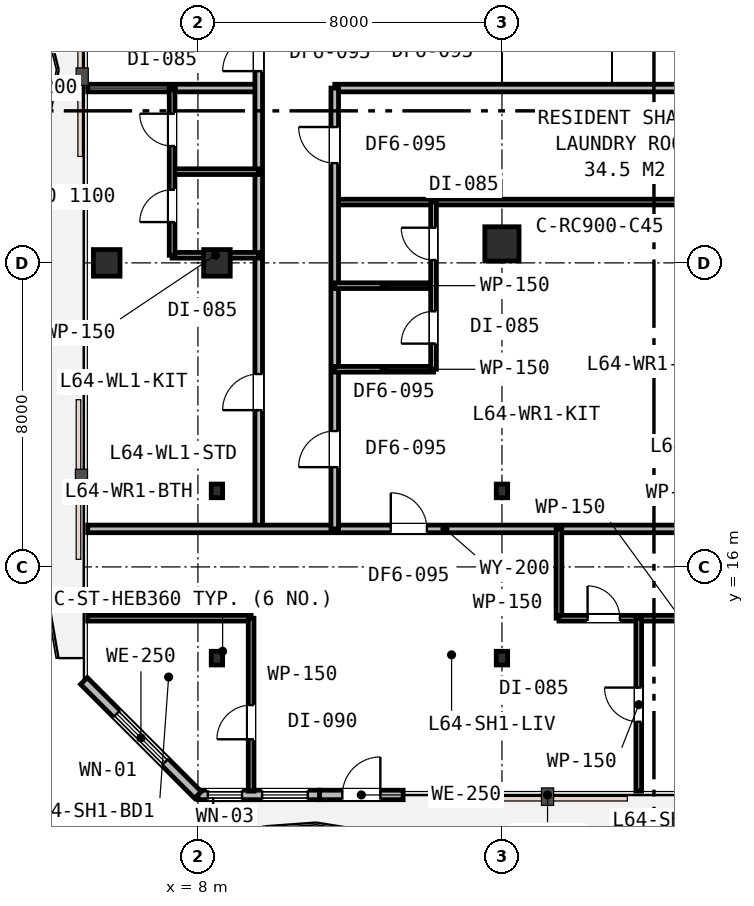
"""IFC4 building model, lengths in metres.
Left out: names, types, materials, properties, quantities, classifications, styles, units other than length and angle.
Written with IfcOpenShell. Run it as: python <this file> out.ifc"""

import sys

from ifc_helpers import new_model, si_unit, direction, frame, frame_2d, origin, origin_2d, place, context, subcontext, project, spatial, rectangle, i_section, extrude, element, fill, save


model = new_model("IFC4")
c1 = context("Model", 3, precision=1e-05, world=origin(), true_north=direction((0.0, 1.0)))
c2 = subcontext(c1, "Body", "Model", "MODEL_VIEW")
j1 = project(units=[si_unit("LENGTHUNIT", "METRE"), si_unit("PLANEANGLEUNIT", "RADIAN")], contexts=[c1])
p1 = place(None, origin())
s1 = spatial("IfcSite", under=j1, at=p1, CompositionType="ELEMENT")
p2 = place(p1, origin())
s2 = spatial("IfcBuilding", under=s1, at=p2, CompositionType="ELEMENT")
p3 = place(p2, frame((0.0, 0.0, 248.8)))
s3 = spatial("IfcBuildingStorey", under=s2, at=p3, CompositionType="ELEMENT", Elevation=248.8)
p4 = place(p3, frame((8.5, 24.0, 0.0), z_axis=(0.0, 0.0, 1.0), x_axis=(1.0, 0.0, 0.0)))
e1 = element("IfcColumn", 1, at=p4, inside=s3, PredefinedType="COLUMN", context=c2, shape_type="SweptSolid", body=[
    extrude(rectangle(XDim=0.7, YDim=0.7, at=origin_2d()), origin(), (0.0, 0.0, 1.0), 3.8),
])
p5 = place(p3, frame((16.0, 24.5, 0.0), z_axis=(0.0, 0.0, 1.0), x_axis=(1.0, 0.0, 0.0)))
e2 = element("IfcColumn", 2, at=p5, inside=s3, PredefinedType="COLUMN", context=c2, shape_type="SweptSolid", body=[
    extrude(rectangle(XDim=0.9, YDim=0.9, at=origin_2d()), origin(), (0.0, 0.0, 1.0), 3.8),
])
p6 = place(p3, frame((5.6, 24.0, 0.0), z_axis=(0.0, 0.0, 1.0), x_axis=(1.0, 0.0, 0.0)))
e3 = element("IfcColumn", 3, at=p6, inside=s3, PredefinedType="COLUMN", context=c2, shape_type="SweptSolid", body=[
    extrude(rectangle(XDim=0.7, YDim=0.7, at=origin_2d()), origin(), (0.0, 0.0, 1.0), 3.8),
])
for number, where, z_axis, x_axis in (
    (4, (8.5, 13.6, 0.0), (0.0, 0.0, 1.0), (1.0, 0.0, 0.0)),
    (5, (16.0, 13.6, 0.0), (0.0, 0.0, 1.0), (1.0, 0.0, 0.0)),
    (6, (8.5, 18.0, 0.0), (0.0, 0.0, 1.0), (1.0, 0.0, 0.0)),
    (7, (16.0, 18.0, 0.0), (0.0, 0.0, 1.0), (1.0, 0.0, 0.0)),
):
    element("IfcColumn", number, at=place(p3, frame(where, z_axis=z_axis, x_axis=x_axis)), inside=s3, PredefinedType="COLUMN", context=c2, shape_type="SweptSolid", body=[
        extrude(i_section(OverallWidth=0.3, OverallDepth=0.36, WebThickness=0.013, FlangeThickness=0.022, FilletRadius=0.027, at=origin_2d()), origin(), (0.0, 0.0, 1.0), 3.8),
    ])
p7 = place(p3, frame((11.2, 10.0, 0.0), z_axis=(0.0, 0.0, 1.0), x_axis=(1.0, 0.0, 0.0)))
e8 = element("IfcWall", 8, at=p7, inside=s3, PredefinedType="STANDARD", context=c2, shape_type="SweptSolid", body=[
    extrude(rectangle(XDim=2.2, YDim=0.25, at=frame_2d((1.1, 0.0))), origin(), (0.0, 0.0, 1.0), 3.53),
])
p8 = place(p7, frame((0.6, 0.0, 0.0)))
e9 = element("IfcOpeningElement", 9, at=p8, cuts=e8, PredefinedType="OPENING", context=c2, shape_type="SweptSolid", body=[
    extrude(rectangle(XDim=1.0, YDim=2.15, at=frame_2d((0.5, 1.075))), frame((0.0, 0.135, 0.0), z_axis=(0.0, -1.0, 0.0), x_axis=(1.0, 0.0, 0.0)), (0.0, 0.0, 1.0), 0.27),
])
p9 = place(p3, frame((8.0, 10.0, 0.0), z_axis=(0.0, 0.0, 1.0), x_axis=(1.0, 0.0, 0.0)))
e10 = element("IfcWall", 10, at=p9, inside=s3, PredefinedType="STANDARD", context=c2, shape_type="SweptSolid", body=[
    extrude(rectangle(XDim=3.2, YDim=0.25, at=frame_2d((1.6, 0.0))), origin(), (0.0, 0.0, 1.0), 3.53),
])
p10 = place(p9, frame((0.26, 0.0, 0.9)))
e11 = element("IfcOpeningElement", 11, at=p10, cuts=e10, PredefinedType="OPENING", context=c2, shape_type="SweptSolid", body=[
    extrude(rectangle(XDim=0.9, YDim=1.55, at=frame_2d((0.45, 0.775))), frame((0.0, 0.135, 0.0), z_axis=(0.0, -1.0, 0.0), x_axis=(1.0, 0.0, 0.0)), (0.0, 0.0, 1.0), 0.27),
])
p11 = place(p9, frame((1.69, 0.0, 0.85)))
e12 = element("IfcOpeningElement", 12, at=p11, cuts=e10, PredefinedType="OPENING", context=c2, shape_type="SweptSolid", body=[
    extrude(rectangle(XDim=1.2, YDim=1.6, at=frame_2d((0.6, 0.8))), frame((0.0, 0.135, 0.0), z_axis=(0.0, -1.0, 0.0), x_axis=(1.0, 0.0, 0.0)), (0.0, 0.0, 1.0), 0.27),
])
p12 = place(p3, frame((5.0, 13.0, 0.0), z_axis=(0.0, 0.0, 1.0), x_axis=(0.707106781187, -0.707106781187, 0.0)))
e13 = element("IfcWall", 13, at=p12, inside=s3, PredefinedType="STANDARD", context=c2, shape_type="SweptSolid", body=[
    extrude(rectangle(XDim=4.243, YDim=0.25, at=frame_2d((2.121, 0.0))), origin(), (0.0, 0.0, 1.0), 3.53),
])
p13 = place(p12, frame((1.221, 0.0, 0.75)))
e14 = element("IfcOpeningElement", 14, at=p13, cuts=e13, PredefinedType="OPENING", context=c2, shape_type="SweptSolid", body=[
    extrude(rectangle(XDim=1.8, YDim=1.85, at=frame_2d((0.9, 0.925))), frame((0.0, 0.135, 0.0), z_axis=(0.0, -1.0, 0.0), x_axis=(1.0, 0.0, 0.0)), (0.0, 0.0, 1.0), 0.27),
])
p14 = place(p3, frame((5.1, 28.6, 0.0), z_axis=(0.0, 0.0, 1.0), x_axis=(1.0, 0.0, 0.0)))
e15 = element("IfcWall", 15, at=p14, inside=s3, PredefinedType="PARTITIONING", context=c2, shape_type="SweptSolid", body=[
    extrude(rectangle(XDim=4.5, YDim=0.2, at=frame_2d((2.25, 0.0))), origin(), (0.0, 0.0, 1.0), 3.16),
])
p15 = place(p3, frame((11.6, 28.6, 0.0), z_axis=(0.0, 0.0, 1.0), x_axis=(1.0, 0.0, 0.0)))
e16 = element("IfcWall", 16, at=p15, inside=s3, PredefinedType="PARTITIONING", context=c2, shape_type="SweptSolid", body=[
    extrude(rectangle(XDim=34.3, YDim=0.2, at=frame_2d((17.15, 0.0))), origin(), (0.0, 0.0, 1.0), 3.16),
])
p16 = place(p15, frame((14.625, 0.0, 0.0)))
e17 = element("IfcOpeningElement", 17, at=p16, cuts=e16, PredefinedType="OPENING", context=c2, shape_type="SweptSolid", body=[
    extrude(rectangle(XDim=0.95, YDim=2.15, at=frame_2d((0.475, 1.075))), frame((0.0, 0.11, 0.0), z_axis=(0.0, -1.0, 0.0), x_axis=(1.0, 0.0, 0.0)), (0.0, 0.0, 1.0), 0.22),
])
p17 = place(p15, frame((26.225, 0.0, 0.0)))
e18 = element("IfcOpeningElement", 18, at=p17, cuts=e16, PredefinedType="OPENING", context=c2, shape_type="SweptSolid", body=[
    extrude(rectangle(XDim=0.95, YDim=2.15, at=frame_2d((0.475, 1.075))), frame((0.0, 0.11, 0.0), z_axis=(0.0, -1.0, 0.0), x_axis=(1.0, 0.0, 0.0)), (0.0, 0.0, 1.0), 0.22),
])
p18 = place(p3, frame((9.6, 17.0, 0.0), z_axis=(0.0, 0.0, 1.0), x_axis=(0.0, 1.0, 0.0)))
e19 = element("IfcWall", 19, at=p18, inside=s3, PredefinedType="PARTITIONING", context=c2, shape_type="SweptSolid", body=[
    extrude(rectangle(XDim=25.9, YDim=0.2, at=frame_2d((12.95, 0.0))), origin(), (0.0, 0.0, 1.0), 3.16),
])
p19 = place(p18, frame((12.045, 0.0, 0.0)))
e20 = element("IfcOpeningElement", 20, at=p19, cuts=e19, PredefinedType="OPENING", context=c2, shape_type="SweptSolid", body=[
    extrude(rectangle(XDim=0.95, YDim=2.15, at=frame_2d((0.475, 1.075))), frame((0.0, 0.11, 0.0), z_axis=(0.0, -1.0, 0.0), x_axis=(1.0, 0.0, 0.0)), (0.0, 0.0, 1.0), 0.22),
])
p20 = place(p18, frame((3.125, 0.0, 0.0)))
e21 = element("IfcOpeningElement", 21, at=p20, cuts=e19, PredefinedType="OPENING", context=c2, shape_type="SweptSolid", body=[
    extrude(rectangle(XDim=0.95, YDim=2.15, at=frame_2d((0.475, 1.075))), frame((0.0, 0.11, 0.0), z_axis=(0.0, -1.0, 0.0), x_axis=(1.0, 0.0, 0.0)), (0.0, 0.0, 1.0), 0.22),
])
p21 = place(p3, frame((5.1, 17.0, 0.0), z_axis=(0.0, 0.0, 1.0), x_axis=(1.0, 0.0, 0.0)))
e22 = element("IfcWall", 22, at=p21, inside=s3, PredefinedType="PARTITIONING", context=c2, shape_type="SweptSolid", body=[
    extrude(rectangle(XDim=18.8, YDim=0.2, at=frame_2d((9.4, 0.0))), origin(), (0.0, 0.0, 1.0), 3.16),
])
p22 = place(p21, frame((7.975, 0.0, 0.0)))
e23 = element("IfcOpeningElement", 23, at=p22, cuts=e22, PredefinedType="OPENING", context=c2, shape_type="SweptSolid", body=[
    extrude(rectangle(XDim=0.95, YDim=2.15, at=frame_2d((0.475, 1.075))), frame((0.0, 0.11, 0.0), z_axis=(0.0, -1.0, 0.0), x_axis=(1.0, 0.0, 0.0)), (0.0, 0.0, 1.0), 0.22),
])
for number, where, z_axis, x_axis in (
    (24, (7.32, 24.2, 0.0), (0.0, 0.0, 1.0), (1.0, 0.0, 0.0)),
    (25, (7.32, 26.4, 0.0), (0.0, 0.0, 1.0), (1.0, 0.0, 0.0)),
):
    element("IfcWall", number, at=place(p3, frame(where, z_axis=z_axis, x_axis=x_axis)), inside=s3, PredefinedType="PARTITIONING", context=c2, shape_type="SweptSolid", body=[
        extrude(rectangle(XDim=2.28, YDim=0.15, at=frame_2d((1.14, 0.0))), origin(), (0.0, 0.0, 1.0), 3.16),
    ])
p23 = place(p3, frame((7.32, 24.2, 0.0), z_axis=(0.0, 0.0, 1.0), x_axis=(0.0, 1.0, 0.0)))
e26 = element("IfcWall", 26, at=p23, inside=s3, PredefinedType="PARTITIONING", context=c2, shape_type="SweptSolid", body=[
    extrude(rectangle(XDim=4.4, YDim=0.15, at=frame_2d((2.2, 0.0))), origin(), (0.0, 0.0, 1.0), 3.16),
])
p24 = place(p23, frame((0.873, 0.0, 0.0)))
e27 = element("IfcOpeningElement", 27, at=p24, cuts=e26, PredefinedType="OPENING", context=c2, shape_type="SweptSolid", body=[
    extrude(rectangle(XDim=0.85, YDim=2.15, at=frame_2d((0.425, 1.075))), frame((0.0, 0.085, 0.0), z_axis=(0.0, -1.0, 0.0), x_axis=(1.0, 0.0, 0.0)), (0.0, 0.0, 1.0), 0.17),
])
p25 = place(p23, frame((2.875, 0.0, 0.0)))
e28 = element("IfcOpeningElement", 28, at=p25, cuts=e26, PredefinedType="OPENING", context=c2, shape_type="SweptSolid", body=[
    extrude(rectangle(XDim=0.85, YDim=2.15, at=frame_2d((0.425, 1.075))), frame((0.0, 0.085, 0.0), z_axis=(0.0, -1.0, 0.0), x_axis=(1.0, 0.0, 0.0)), (0.0, 0.0, 1.0), 0.17),
])
p26 = place(p3, frame((11.6, 25.6, 0.0), z_axis=(0.0, 0.0, 1.0), x_axis=(1.0, 0.0, 0.0)))
e29 = element("IfcWall", 29, at=p26, inside=s3, PredefinedType="PARTITIONING", context=c2, shape_type="SweptSolid", body=[
    extrude(rectangle(XDim=12.3, YDim=0.15, at=frame_2d((6.15, 0.0))), origin(), (0.0, 0.0, 1.0), 3.16),
])
p27 = place(p3, frame((11.6, 17.0, 0.0), z_axis=(0.0, 0.0, 1.0), x_axis=(0.0, 1.0, 0.0)))
e30 = element("IfcWall", 30, at=p27, inside=s3, PredefinedType="PARTITIONING", context=c2, shape_type="SweptSolid", body=[
    extrude(rectangle(XDim=11.6, YDim=0.2, at=frame_2d((5.8, 0.0))), origin(), (0.0, 0.0, 1.0), 3.16),
])
p28 = place(p27, frame((9.625, 0.0, 0.0)))
e31 = element("IfcOpeningElement", 31, at=p28, cuts=e30, PredefinedType="OPENING", context=c2, shape_type="SweptSolid", body=[
    extrude(rectangle(XDim=0.95, YDim=2.15, at=frame_2d((0.475, 1.075))), frame((0.0, 0.11, 0.0), z_axis=(0.0, -1.0, 0.0), x_axis=(1.0, 0.0, 0.0)), (0.0, 0.0, 1.0), 0.22),
])
p29 = place(p27, frame((1.625, 0.0, 0.0)))
e32 = element("IfcOpeningElement", 32, at=p29, cuts=e30, PredefinedType="OPENING", context=c2, shape_type="SweptSolid", body=[
    extrude(rectangle(XDim=0.95, YDim=2.15, at=frame_2d((0.475, 1.075))), frame((0.0, 0.11, 0.0), z_axis=(0.0, -1.0, 0.0), x_axis=(1.0, 0.0, 0.0)), (0.0, 0.0, 1.0), 0.22),
])
for number, where, z_axis, x_axis in (
    (33, (11.6, 21.2, 0.0), (0.0, 0.0, 1.0), (1.0, 0.0, 0.0)),
    (34, (11.6, 23.4, 0.0), (0.0, 0.0, 1.0), (1.0, 0.0, 0.0)),
):
    element("IfcWall", number, at=place(p3, frame(where, z_axis=z_axis, x_axis=x_axis)), inside=s3, PredefinedType="PARTITIONING", context=c2, shape_type="SweptSolid", body=[
        extrude(rectangle(XDim=2.6, YDim=0.15, at=frame_2d((1.3, 0.0))), origin(), (0.0, 0.0, 1.0), 3.53),
    ])
p30 = place(p3, frame((14.2, 21.2, 0.0), z_axis=(0.0, 0.0, 1.0), x_axis=(0.0, 1.0, 0.0)))
e35 = element("IfcWall", 35, at=p30, inside=s3, PredefinedType="PARTITIONING", context=c2, shape_type="SweptSolid", body=[
    extrude(rectangle(XDim=4.4, YDim=0.15, at=frame_2d((2.2, 0.0))), origin(), (0.0, 0.0, 1.0), 3.16),
])
p31 = place(p30, frame((0.675, 0.0, 0.0)))
e36 = element("IfcOpeningElement", 36, at=p31, cuts=e35, PredefinedType="OPENING", context=c2, shape_type="SweptSolid", body=[
    extrude(rectangle(XDim=0.85, YDim=2.15, at=frame_2d((0.425, 1.075))), frame((0.0, 0.085, 0.0), z_axis=(0.0, -1.0, 0.0), x_axis=(1.0, 0.0, 0.0)), (0.0, 0.0, 1.0), 0.17),
])
p32 = place(p30, frame((2.875, 0.0, 0.0)))
e37 = element("IfcOpeningElement", 37, at=p32, cuts=e35, PredefinedType="OPENING", context=c2, shape_type="SweptSolid", body=[
    extrude(rectangle(XDim=0.85, YDim=2.15, at=frame_2d((0.425, 1.075))), frame((0.0, 0.085, 0.0), z_axis=(0.0, -1.0, 0.0), x_axis=(1.0, 0.0, 0.0)), (0.0, 0.0, 1.0), 0.17),
])
p33 = place(p3, frame((17.5, 14.65, 0.0), z_axis=(0.0, 0.0, 1.0), x_axis=(0.0, 1.0, 0.0)))
e38 = element("IfcWall", 38, at=p33, inside=s3, PredefinedType="PARTITIONING", context=c2, shape_type="SweptSolid", body=[
    extrude(rectangle(XDim=2.35, YDim=0.15, at=frame_2d((1.175, 0.0))), origin(), (0.0, 0.0, 1.0), 3.53),
])
p34 = place(p3, frame((17.5, 14.65, 0.0), z_axis=(0.0, 0.0, 1.0), x_axis=(1.0, 0.0, 0.0)))
e39 = element("IfcWall", 39, at=p34, inside=s3, PredefinedType="PARTITIONING", context=c2, shape_type="SweptSolid", body=[
    extrude(rectangle(XDim=6.4, YDim=0.15, at=frame_2d((3.2, 0.0))), origin(), (0.0, 0.0, 1.0), 3.27),
])
p35 = place(p34, frame((0.753, 0.0, 0.0)))
e40 = element("IfcOpeningElement", 40, at=p35, cuts=e39, PredefinedType="OPENING", context=c2, shape_type="SweptSolid", body=[
    extrude(rectangle(XDim=0.85, YDim=2.15, at=frame_2d((0.425, 1.075))), frame((0.0, 0.085, 0.0), z_axis=(0.0, -1.0, 0.0), x_axis=(1.0, 0.0, 0.0)), (0.0, 0.0, 1.0), 0.17),
])
p36 = place(p34, frame((3.771, 0.0, 0.0)))
e41 = element("IfcOpeningElement", 41, at=p36, cuts=e39, PredefinedType="OPENING", context=c2, shape_type="SweptSolid", body=[
    extrude(rectangle(XDim=0.85, YDim=2.15, at=frame_2d((0.425, 1.075))), frame((0.0, 0.085, 0.0), z_axis=(0.0, -1.0, 0.0), x_axis=(1.0, 0.0, 0.0)), (0.0, 0.0, 1.0), 0.17),
])
p37 = place(p3, frame((5.1, 14.65, 0.0), z_axis=(0.0, 0.0, 1.0), x_axis=(1.0, 0.0, 0.0)))
e42 = element("IfcWall", 42, at=p37, inside=s3, PredefinedType="PARTITIONING", context=c2, shape_type="SweptSolid", body=[
    extrude(rectangle(XDim=4.3, YDim=0.15, at=frame_2d((2.15, 0.0))), origin(), (0.0, 0.0, 1.0), 3.16),
])
p38 = place(p3, frame((9.4, 10.1, 0.0), z_axis=(0.0, 0.0, 1.0), x_axis=(0.0, 1.0, 0.0)))
e43 = element("IfcWall", 43, at=p38, inside=s3, PredefinedType="PARTITIONING", context=c2, shape_type="SweptSolid", body=[
    extrude(rectangle(XDim=4.55, YDim=0.15, at=frame_2d((2.275, 0.0))), origin(), (0.0, 0.0, 1.0), 3.16),
])
p39 = place(p38, frame((1.365, 0.0, 0.0)))
e44 = element("IfcOpeningElement", 44, at=p39, cuts=e43, PredefinedType="OPENING", context=c2, shape_type="SweptSolid", body=[
    extrude(rectangle(XDim=0.9, YDim=2.15, at=frame_2d((0.45, 1.075))), frame((0.0, 0.085, 0.0), z_axis=(0.0, -1.0, 0.0), x_axis=(1.0, 0.0, 0.0)), (0.0, 0.0, 1.0), 0.17),
])
p40 = place(p3, frame((19.6, 10.1, 0.0), z_axis=(0.0, 0.0, 1.0), x_axis=(0.0, 1.0, 0.0)))
e45 = element("IfcWall", 45, at=p40, inside=s3, PredefinedType="PARTITIONING", context=c2, shape_type="SweptSolid", body=[
    extrude(rectangle(XDim=4.55, YDim=0.15, at=frame_2d((2.275, 0.0))), origin(), (0.0, 0.0, 1.0), 3.16),
])
p41 = place(p40, frame((1.825, 0.0, 0.0)))
e46 = element("IfcOpeningElement", 46, at=p41, cuts=e45, PredefinedType="OPENING", context=c2, shape_type="SweptSolid", body=[
    extrude(rectangle(XDim=0.9, YDim=2.15, at=frame_2d((0.45, 1.075))), frame((0.0, 0.085, 0.0), z_axis=(0.0, -1.0, 0.0), x_axis=(1.0, 0.0, 0.0)), (0.0, 0.0, 1.0), 0.17),
])
p42 = place(p8, origin())
e47 = element("IfcDoor", 47, at=p42, inside=s3, OperationType="SINGLE_SWING_RIGHT", PredefinedType="DOOR", context=c2, shape_type="SweptSolid", body=[
    extrude(rectangle(XDim=1.0, YDim=2.15, at=frame_2d((0.5, 1.075))), frame((0.0, 0.025, 0.0), z_axis=(0.0, -1.0, 0.0), x_axis=(1.0, 0.0, 0.0)), (0.0, 0.0, 1.0), 0.05),
])
fill(e9, e47)
p43 = place(p10, origin())
e48 = element("IfcWindow", 48, at=p43, inside=s3, PartitioningType="SINGLE_PANEL", PredefinedType="WINDOW", context=c2, shape_type="SweptSolid", body=[
    extrude(rectangle(XDim=0.9, YDim=1.55, at=frame_2d((0.45, 0.775))), frame((0.0, 0.03, 0.0), z_axis=(0.0, -1.0, 0.0), x_axis=(1.0, 0.0, 0.0)), (0.0, 0.0, 1.0), 0.06),
])
fill(e11, e48)
p44 = place(p11, origin())
e49 = element("IfcWindow", 49, at=p44, inside=s3, PartitioningType="SINGLE_PANEL", PredefinedType="WINDOW", context=c2, shape_type="SweptSolid", body=[
    extrude(rectangle(XDim=1.2, YDim=1.6, at=frame_2d((0.6, 0.8))), frame((0.0, 0.03, 0.0), z_axis=(0.0, -1.0, 0.0), x_axis=(1.0, 0.0, 0.0)), (0.0, 0.0, 1.0), 0.06),
])
fill(e12, e49)
p45 = place(p13, origin())
e50 = element("IfcWindow", 50, at=p45, inside=s3, PartitioningType="SINGLE_PANEL", PredefinedType="WINDOW", context=c2, shape_type="SweptSolid", body=[
    extrude(rectangle(XDim=1.8, YDim=1.85, at=frame_2d((0.9, 0.925))), frame((0.0, 0.03, 0.0), z_axis=(0.0, -1.0, 0.0), x_axis=(1.0, 0.0, 0.0)), (0.0, 0.0, 1.0), 0.06),
])
fill(e14, e50)
p46 = place(p19, origin())
e51 = element("IfcDoor", 51, at=p46, inside=s3, OperationType="SINGLE_SWING_LEFT", PredefinedType="DOOR", context=c2, shape_type="SweptSolid", body=[
    extrude(rectangle(XDim=0.95, YDim=2.15, at=frame_2d((0.475, 1.075))), frame((0.0, 0.025, 0.0), z_axis=(0.0, -1.0, 0.0), x_axis=(1.0, 0.0, 0.0)), (0.0, 0.0, 1.0), 0.05),
])
fill(e20, e51)
p47 = place(p20, origin())
e52 = element("IfcDoor", 52, at=p47, inside=s3, OperationType="SINGLE_SWING_LEFT", PredefinedType="DOOR", context=c2, shape_type="SweptSolid", body=[
    extrude(rectangle(XDim=0.95, YDim=2.15, at=frame_2d((0.475, 1.075))), frame((0.0, 0.025, 0.0), z_axis=(0.0, -1.0, 0.0), x_axis=(1.0, 0.0, 0.0)), (0.0, 0.0, 1.0), 0.05),
])
fill(e21, e52)
p48 = place(p24, origin())
e53 = element("IfcDoor", 53, at=p48, inside=s3, OperationType="SINGLE_SWING_LEFT", PredefinedType="DOOR", context=c2, shape_type="SweptSolid", body=[
    extrude(rectangle(XDim=0.85, YDim=2.15, at=frame_2d((0.425, 1.075))), frame((0.0, 0.025, 0.0), z_axis=(0.0, -1.0, 0.0), x_axis=(1.0, 0.0, 0.0)), (0.0, 0.0, 1.0), 0.05),
])
fill(e27, e53)
p49 = place(p25, origin())
e54 = element("IfcDoor", 54, at=p49, inside=s3, OperationType="SINGLE_SWING_RIGHT", PredefinedType="DOOR", context=c2, shape_type="SweptSolid", body=[
    extrude(rectangle(XDim=0.85, YDim=2.15, at=frame_2d((0.425, 1.075))), frame((0.0, 0.025, 0.0), z_axis=(0.0, -1.0, 0.0), x_axis=(1.0, 0.0, 0.0)), (0.0, 0.0, 1.0), 0.05),
])
fill(e28, e54)
p50 = place(p28, origin())
e55 = element("IfcDoor", 55, at=p50, inside=s3, OperationType="SINGLE_SWING_RIGHT", PredefinedType="DOOR", context=c2, shape_type="SweptSolid", body=[
    extrude(rectangle(XDim=0.95, YDim=2.15, at=frame_2d((0.475, 1.075))), frame((0.0, 0.025, 0.0), z_axis=(0.0, -1.0, 0.0), x_axis=(1.0, 0.0, 0.0)), (0.0, 0.0, 1.0), 0.05),
])
fill(e31, e55)
p51 = place(p29, origin())
e56 = element("IfcDoor", 56, at=p51, inside=s3, OperationType="SINGLE_SWING_LEFT", PredefinedType="DOOR", context=c2, shape_type="SweptSolid", body=[
    extrude(rectangle(XDim=0.95, YDim=2.15, at=frame_2d((0.475, 1.075))), frame((0.0, 0.025, 0.0), z_axis=(0.0, -1.0, 0.0), x_axis=(1.0, 0.0, 0.0)), (0.0, 0.0, 1.0), 0.05),
])
fill(e32, e56)
p52 = place(p31, origin())
e57 = element("IfcDoor", 57, at=p52, inside=s3, OperationType="SINGLE_SWING_LEFT", PredefinedType="DOOR", context=c2, shape_type="SweptSolid", body=[
    extrude(rectangle(XDim=0.85, YDim=2.15, at=frame_2d((0.425, 1.075))), frame((0.0, 0.025, 0.0), z_axis=(0.0, -1.0, 0.0), x_axis=(1.0, 0.0, 0.0)), (0.0, 0.0, 1.0), 0.05),
])
fill(e36, e57)
p53 = place(p32, origin())
e58 = element("IfcDoor", 58, at=p53, inside=s3, OperationType="SINGLE_SWING_RIGHT", PredefinedType="DOOR", context=c2, shape_type="SweptSolid", body=[
    extrude(rectangle(XDim=0.85, YDim=2.15, at=frame_2d((0.425, 1.075))), frame((0.0, 0.025, 0.0), z_axis=(0.0, -1.0, 0.0), x_axis=(1.0, 0.0, 0.0)), (0.0, 0.0, 1.0), 0.05),
])
fill(e37, e58)
p54 = place(p22, origin())
e59 = element("IfcDoor", 59, at=p54, inside=s3, OperationType="SINGLE_SWING_LEFT", PredefinedType="DOOR", context=c2, shape_type="SweptSolid", body=[
    extrude(rectangle(XDim=0.95, YDim=2.15, at=frame_2d((0.475, 1.075))), frame((0.0, 0.025, 0.0), z_axis=(0.0, -1.0, 0.0), x_axis=(1.0, 0.0, 0.0)), (0.0, 0.0, 1.0), 0.05),
])
fill(e23, e59)
p55 = place(p35, origin())
e60 = element("IfcDoor", 60, at=p55, inside=s3, OperationType="SINGLE_SWING_LEFT", PredefinedType="DOOR", context=c2, shape_type="SweptSolid", body=[
    extrude(rectangle(XDim=0.85, YDim=2.15, at=frame_2d((0.425, 1.075))), frame((0.0, 0.025, 0.0), z_axis=(0.0, -1.0, 0.0), x_axis=(1.0, 0.0, 0.0)), (0.0, 0.0, 1.0), 0.05),
])
fill(e40, e60)
p56 = place(p39, origin())
e61 = element("IfcDoor", 61, at=p56, inside=s3, OperationType="SINGLE_SWING_LEFT", PredefinedType="DOOR", context=c2, shape_type="SweptSolid", body=[
    extrude(rectangle(XDim=0.9, YDim=2.15, at=frame_2d((0.45, 1.075))), frame((0.0, 0.025, 0.0), z_axis=(0.0, -1.0, 0.0), x_axis=(1.0, 0.0, 0.0)), (0.0, 0.0, 1.0), 0.05),
])
fill(e44, e61)
p57 = place(p41, origin())
e62 = element("IfcDoor", 62, at=p57, inside=s3, OperationType="SINGLE_SWING_RIGHT", PredefinedType="DOOR", context=c2, shape_type="SweptSolid", body=[
    extrude(rectangle(XDim=0.9, YDim=2.15, at=frame_2d((0.45, 1.075))), frame((0.0, 0.025, 0.0), z_axis=(0.0, -1.0, 0.0), x_axis=(1.0, 0.0, 0.0)), (0.0, 0.0, 1.0), 0.05),
])
fill(e46, e62)
save(model, sys.argv[1])
